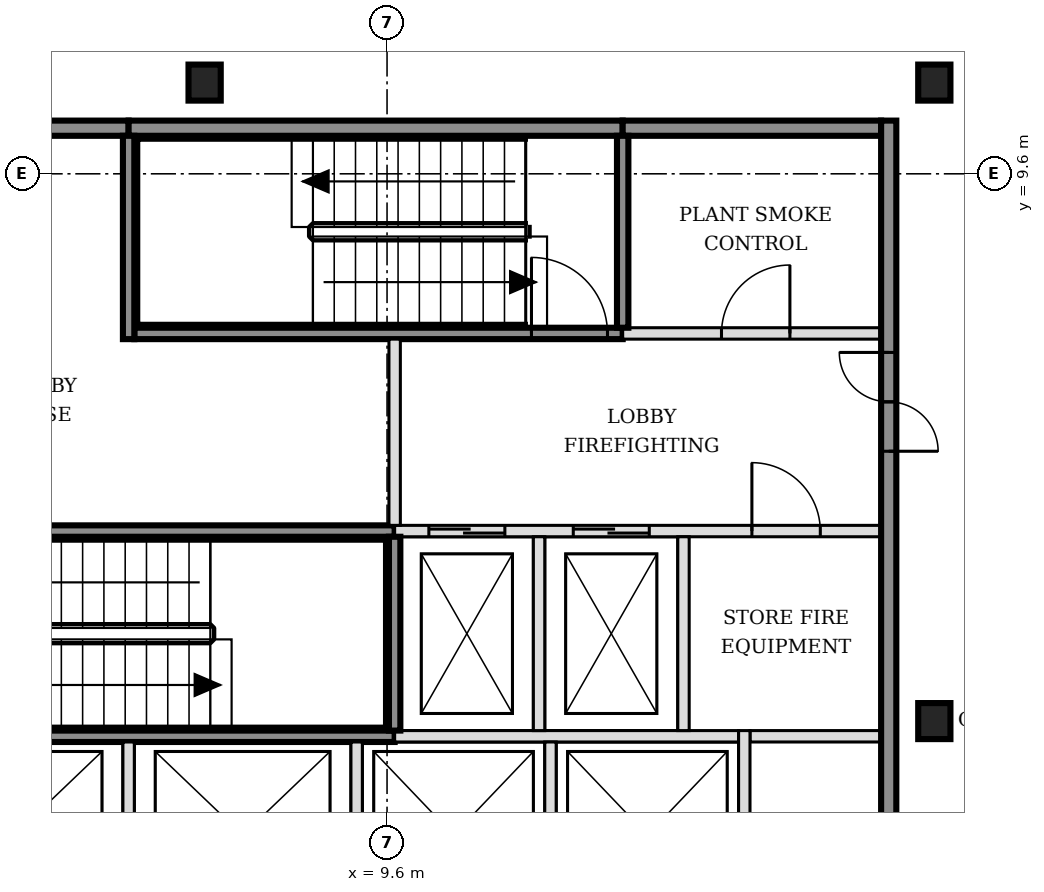
"""IFC4 building model, lengths in metres.
Left out: names, types, materials, properties, quantities, classifications, styles, units other than length and angle.
Written with IfcOpenShell. Run it as: python <this file> out.ifc"""

import sys

from ifc_helpers import new_model, si_unit, direction, frame, frame_2d, origin, origin_2d, place, context, subcontext, project, spatial, rectangle, i_section, extrude, element, fill, save


model = new_model("IFC4")
c1 = context("Model", 3, precision=1e-05, world=origin(), true_north=direction((0.0, 1.0)))
c2 = subcontext(c1, "Body", "Model", "MODEL_VIEW")
j1 = project(units=[si_unit("LENGTHUNIT", "METRE"), si_unit("PLANEANGLEUNIT", "RADIAN")], contexts=[c1])
p1 = place(None, origin())
s1 = spatial("IfcSite", under=j1, at=p1, CompositionType="ELEMENT")
p2 = place(p1, origin())
s2 = spatial("IfcBuilding", under=s1, at=p2, CompositionType="ELEMENT")
p3 = place(p2, frame((0.0, 0.0, 125.4)))
s3 = spatial("IfcBuildingStorey", under=s2, at=p3, CompositionType="ELEMENT", Elevation=125.4)
for number, where, z_axis, x_axis in (
    (1, (16.8, 2.4, -0.15), (0.0, 0.0, 1.0), (1.0, 0.0, 0.0)),
    (2, (7.2, 10.8, -0.15), (0.0, 0.0, 1.0), (1.0, 0.0, 0.0)),
    (3, (16.8, 10.8, -0.15), (0.0, 0.0, 1.0), (1.0, 0.0, 0.0)),
):
    element("IfcColumn", number, at=place(p3, frame(where, z_axis=z_axis, x_axis=x_axis)), inside=s3, PredefinedType="COLUMN", context=c2, shape_type="SweptSolid", body=[
        extrude(i_section(OverallWidth=0.424, OverallDepth=0.474, WebThickness=0.048, FlangeThickness=0.077, FilletRadius=0.015, at=origin_2d()), origin(), (0.0, 0.0, 1.0), 3.6),
    ])
p4 = place(p3, frame((3.2, 2.2, 0.0), z_axis=(0.0, 0.0, 1.0), x_axis=(1.0, 0.0, 0.0)))
e4 = element("IfcWall", 4, at=p4, inside=s3, PredefinedType="SOLIDWALL", context=c2, shape_type="SweptSolid", body=[
    extrude(rectangle(XDim=6.5, YDim=0.15, at=frame_2d((3.25, 0.0))), origin(), (0.0, 0.0, 1.0), 3.45),
])
p5 = place(p3, frame((9.7, 2.2, 0.0), z_axis=(0.0, 0.0, 1.0), x_axis=(1.0, 0.0, 0.0)))
e5 = element("IfcWall", 5, at=p5, inside=s3, PredefinedType="SOLIDWALL", context=c2, shape_type="SweptSolid", body=[
    extrude(rectangle(XDim=4.525, YDim=0.15, at=frame_2d((2.263, 0.0))), origin(), (0.0, 0.0, 1.0), 3.45),
])
p6 = place(p3, frame((14.375, 2.2, 0.0), z_axis=(0.0, 0.0, 1.0), x_axis=(1.0, 0.0, 0.0)))
e6 = element("IfcWall", 6, at=p6, inside=s3, PredefinedType="PARTITIONING", context=c2, shape_type="SweptSolid", body=[
    extrude(rectangle(XDim=1.725, YDim=0.15, at=frame_2d((0.863, 0.0))), origin(), (0.0, 0.0, 1.0), 3.45),
])
p7 = place(p3, frame((3.2, 4.9, 0.0), z_axis=(0.0, 0.0, 1.0), x_axis=(1.0, 0.0, 0.0)))
e7 = element("IfcWall", 7, at=p7, inside=s3, PredefinedType="SOLIDWALL", context=c2, shape_type="SweptSolid", body=[
    extrude(rectangle(XDim=6.5, YDim=0.15, at=frame_2d((3.25, 0.0))), origin(), (0.0, 0.0, 1.0), 3.45),
])
p8 = place(p7, frame((0.175, 0.0, 0.0)))
e8 = element("IfcOpeningElement", 8, at=p8, cuts=e7, PredefinedType="OPENING", context=c2, shape_type="SweptSolid", body=[
    extrude(rectangle(XDim=1.0, YDim=2.1, at=frame_2d((0.5, 1.05))), frame((0.0, 0.085, 0.0), z_axis=(0.0, -1.0, 0.0), x_axis=(1.0, 0.0, 0.0)), (0.0, 0.0, 1.0), 0.17),
])
p9 = place(p3, frame((9.7, 4.9, 0.0), z_axis=(0.0, 0.0, 1.0), x_axis=(1.0, 0.0, 0.0)))
e9 = element("IfcWall", 9, at=p9, inside=s3, PredefinedType="SOLIDWALL", context=c2, shape_type="SweptSolid", body=[
    extrude(rectangle(XDim=6.4, YDim=0.15, at=frame_2d((3.2, 0.0))), origin(), (0.0, 0.0, 1.0), 3.45),
])
p10 = place(p9, frame((0.45, 0.0, 0.0)))
e10 = element("IfcOpeningElement", 10, at=p10, cuts=e9, PredefinedType="OPENING", context=c2, shape_type="SweptSolid", body=[
    extrude(rectangle(XDim=1.0, YDim=2.1, at=frame_2d((0.5, 1.05))), frame((0.0, 0.085, 0.0), z_axis=(0.0, -1.0, 0.0), x_axis=(1.0, 0.0, 0.0)), (0.0, 0.0, 1.0), 0.17),
])
p11 = place(p9, frame((2.35, 0.0, 0.0)))
e11 = element("IfcOpeningElement", 11, at=p11, cuts=e9, PredefinedType="OPENING", context=c2, shape_type="SweptSolid", body=[
    extrude(rectangle(XDim=1.0, YDim=2.1, at=frame_2d((0.5, 1.05))), frame((0.0, 0.085, 0.0), z_axis=(0.0, -1.0, 0.0), x_axis=(1.0, 0.0, 0.0)), (0.0, 0.0, 1.0), 0.17),
])
p12 = place(p9, frame((4.7, 0.0, 0.0)))
e12 = element("IfcOpeningElement", 12, at=p12, cuts=e9, PredefinedType="OPENING", context=c2, shape_type="SweptSolid", body=[
    extrude(rectangle(XDim=0.9, YDim=2.1, at=frame_2d((0.45, 1.05))), frame((0.0, 0.085, 0.0), z_axis=(0.0, -1.0, 0.0), x_axis=(1.0, 0.0, 0.0)), (0.0, 0.0, 1.0), 0.17),
])
p13 = place(p3, frame((6.275, 7.5, 0.0), z_axis=(0.0, 0.0, 1.0), x_axis=(1.0, 0.0, 0.0)))
e13 = element("IfcWall", 13, at=p13, inside=s3, PredefinedType="SOLIDWALL", context=c2, shape_type="SweptSolid", body=[
    extrude(rectangle(XDim=6.425, YDim=0.15, at=frame_2d((3.212, 0.0))), origin(), (0.0, 0.0, 1.0), 3.45),
])
p14 = place(p13, frame((5.225, 0.0, 0.0)))
e14 = element("IfcOpeningElement", 14, at=p14, cuts=e13, PredefinedType="OPENING", context=c2, shape_type="SweptSolid", body=[
    extrude(rectangle(XDim=1.0, YDim=2.1, at=frame_2d((0.5, 1.05))), frame((0.0, 0.085, 0.0), z_axis=(0.0, -1.0, 0.0), x_axis=(1.0, 0.0, 0.0)), (0.0, 0.0, 1.0), 0.17),
])
p15 = place(p3, frame((12.7, 7.5, 0.0), z_axis=(0.0, 0.0, 1.0), x_axis=(1.0, 0.0, 0.0)))
e15 = element("IfcWall", 15, at=p15, inside=s3, PredefinedType="SOLIDWALL", context=c2, shape_type="SweptSolid", body=[
    extrude(rectangle(XDim=3.4, YDim=0.15, at=frame_2d((1.7, 0.0))), origin(), (0.0, 0.0, 1.0), 3.45),
])
p16 = place(p15, frame((1.3, 0.0, 0.0)))
e16 = element("IfcOpeningElement", 16, at=p16, cuts=e15, PredefinedType="OPENING", context=c2, shape_type="SweptSolid", body=[
    extrude(rectangle(XDim=0.9, YDim=2.1, at=frame_2d((0.45, 1.05))), frame((0.0, 0.085, 0.0), z_axis=(0.0, -1.0, 0.0), x_axis=(1.0, 0.0, 0.0)), (0.0, 0.0, 1.0), 0.17),
])
p17 = place(p3, frame((-1.7, 10.2, 0.0), z_axis=(0.0, 0.0, 1.0), x_axis=(1.0, 0.0, 0.0)))
e17 = element("IfcWall", 17, at=p17, inside=s3, PredefinedType="SOLIDWALL", context=c2, shape_type="SweptSolid", body=[
    extrude(rectangle(XDim=7.9, YDim=0.2, at=frame_2d((3.95, 0.0))), origin(), (0.0, 0.0, 1.0), 3.45),
])
p18 = place(p3, frame((6.2, 10.2, 0.0), z_axis=(0.0, 0.0, 1.0), x_axis=(1.0, 0.0, 0.0)))
e18 = element("IfcWall", 18, at=p18, inside=s3, PredefinedType="SOLIDWALL", context=c2, shape_type="SweptSolid", body=[
    extrude(rectangle(XDim=6.5, YDim=0.2, at=frame_2d((3.25, 0.0))), origin(), (0.0, 0.0, 1.0), 3.45),
])
p19 = place(p3, frame((12.7, 10.2, 0.0), z_axis=(0.0, 0.0, 1.0), x_axis=(1.0, 0.0, 0.0)))
e19 = element("IfcWall", 19, at=p19, inside=s3, PredefinedType="SOLIDWALL", context=c2, shape_type="SweptSolid", body=[
    extrude(rectangle(XDim=3.4, YDim=0.2, at=frame_2d((1.7, 0.0))), origin(), (0.0, 0.0, 1.0), 3.45),
])
p20 = place(p3, frame((6.2, -0.325, 0.0), z_axis=(0.0, 0.0, 1.0), x_axis=(0.0, 1.0, 0.0)))
e20 = element("IfcWall", 20, at=p20, inside=s3, PredefinedType="SOLIDWALL", context=c2, shape_type="SweptSolid", body=[
    extrude(rectangle(XDim=2.45, YDim=0.15, at=frame_2d((1.225, 0.0))), origin(), (0.0, 0.0, 1.0), 3.45),
])
p21 = place(p3, frame((6.2, 7.425, 0.0), z_axis=(0.0, 0.0, 1.0), x_axis=(0.0, 1.0, 0.0)))
e21 = element("IfcWall", 21, at=p21, inside=s3, PredefinedType="SOLIDWALL", context=c2, shape_type="SweptSolid", body=[
    extrude(rectangle(XDim=2.675, YDim=0.15, at=frame_2d((1.337, 0.0))), origin(), (0.0, 0.0, 1.0), 3.45),
])
p22 = place(p3, frame((9.2, -0.325, 0.0), z_axis=(0.0, 0.0, 1.0), x_axis=(0.0, 1.0, 0.0)))
e22 = element("IfcWall", 22, at=p22, inside=s3, PredefinedType="SOLIDWALL", context=c2, shape_type="SweptSolid", body=[
    extrude(rectangle(XDim=2.45, YDim=0.15, at=frame_2d((1.225, 0.0))), origin(), (0.0, 0.0, 1.0), 3.45),
])
p23 = place(p3, frame((9.7, 2.275, 0.0), z_axis=(0.0, 0.0, 1.0), x_axis=(0.0, 1.0, 0.0)))
e23 = element("IfcWall", 23, at=p23, inside=s3, PredefinedType="SOLIDWALL", context=c2, shape_type="SweptSolid", body=[
    extrude(rectangle(XDim=2.55, YDim=0.15, at=frame_2d((1.275, 0.0))), origin(), (0.0, 0.0, 1.0), 3.45),
])
p24 = place(p3, frame((9.7, 4.975, 0.0), z_axis=(0.0, 0.0, 1.0), x_axis=(0.0, 1.0, 0.0)))
e24 = element("IfcWall", 24, at=p24, inside=s3, PredefinedType="SOLIDWALL", context=c2, shape_type="SweptSolid", body=[
    extrude(rectangle(XDim=2.45, YDim=0.15, at=frame_2d((1.225, 0.0))), origin(), (0.0, 0.0, 1.0), 3.45),
])
p25 = place(p3, frame((11.6, 2.275, 0.0), z_axis=(0.0, 0.0, 1.0), x_axis=(0.0, 1.0, 0.0)))
e25 = element("IfcWall", 25, at=p25, inside=s3, PredefinedType="SOLIDWALL", context=c2, shape_type="SweptSolid", body=[
    extrude(rectangle(XDim=2.55, YDim=0.15, at=frame_2d((1.275, 0.0))), origin(), (0.0, 0.0, 1.0), 3.45),
])
p26 = place(p3, frame((11.75, -0.325, 0.0), z_axis=(0.0, 0.0, 1.0), x_axis=(0.0, 1.0, 0.0)))
e26 = element("IfcWall", 26, at=p26, inside=s3, PredefinedType="SOLIDWALL", context=c2, shape_type="SweptSolid", body=[
    extrude(rectangle(XDim=2.45, YDim=0.15, at=frame_2d((1.225, 0.0))), origin(), (0.0, 0.0, 1.0), 3.45),
])
p27 = place(p3, frame((12.7, 7.575, 0.0), z_axis=(0.0, 0.0, 1.0), x_axis=(0.0, 1.0, 0.0)))
e27 = element("IfcWall", 27, at=p27, inside=s3, PredefinedType="SOLIDWALL", context=c2, shape_type="SweptSolid", body=[
    extrude(rectangle(XDim=2.525, YDim=0.15, at=frame_2d((1.263, 0.0))), origin(), (0.0, 0.0, 1.0), 3.45),
])
p28 = place(p3, frame((13.5, 2.275, 0.0), z_axis=(0.0, 0.0, 1.0), x_axis=(0.0, 1.0, 0.0)))
e28 = element("IfcWall", 28, at=p28, inside=s3, PredefinedType="SOLIDWALL", context=c2, shape_type="SweptSolid", body=[
    extrude(rectangle(XDim=2.55, YDim=0.15, at=frame_2d((1.275, 0.0))), origin(), (0.0, 0.0, 1.0), 3.45),
])
p29 = place(p3, frame((14.3, -0.475, 0.0), z_axis=(0.0, 0.0, 1.0), x_axis=(0.0, 1.0, 0.0)))
e29 = element("IfcWall", 29, at=p29, inside=s3, PredefinedType="SOLIDWALL", context=c2, shape_type="SweptSolid", body=[
    extrude(rectangle(XDim=2.75, YDim=0.15, at=frame_2d((1.375, 0.0))), origin(), (0.0, 0.0, 1.0), 3.45),
])
p30 = place(p3, frame((16.2, -5.5, 0.0), z_axis=(0.0, 0.0, 1.0), x_axis=(0.0, 1.0, 0.0)))
e30 = element("IfcWall", 30, at=p30, inside=s3, PredefinedType="SOLIDWALL", context=c2, shape_type="SweptSolid", body=[
    extrude(rectangle(XDim=15.8, YDim=0.2, at=frame_2d((7.9, 0.0))), origin(), (0.0, 0.0, 1.0), 3.45),
])
p31 = place(p30, frame((3.05, 0.0, 0.0)))
e31 = element("IfcOpeningElement", 31, at=p31, cuts=e30, PredefinedType="OPENING", context=c2, shape_type="SweptSolid", body=[
    extrude(rectangle(XDim=1.3, YDim=2.1, at=frame_2d((0.65, 1.05))), frame((0.0, 0.11, 0.0), z_axis=(0.0, -1.0, 0.0), x_axis=(1.0, 0.0, 0.0)), (0.0, 0.0, 1.0), 0.22),
])
p32 = place(p30, frame((11.45, 0.0, 0.0)))
e32 = element("IfcOpeningElement", 32, at=p32, cuts=e30, PredefinedType="OPENING", context=c2, shape_type="SweptSolid", body=[
    extrude(rectangle(XDim=1.3, YDim=2.1, at=frame_2d((0.65, 1.05))), frame((0.0, 0.11, 0.0), z_axis=(0.0, -1.0, 0.0), x_axis=(1.0, 0.0, 0.0)), (0.0, 0.0, 1.0), 0.22),
])
p33 = place(p3, frame((27.472, 8.322, 0.0), z_axis=(0.0, 0.0, 1.0), x_axis=(-0.707106781187, 0.707106781187, 0.0)))
e33 = element("IfcWall", 33, at=p33, inside=s3, PredefinedType="PARTITIONING", context=c2, shape_type="SweptSolid", body=[
    extrude(rectangle(XDim=16.9, YDim=0.15, at=frame_2d((8.45, 0.0))), origin(), (0.0, 0.0, 1.0), 2.73),
])
p34 = place(p33, frame((3.044, 0.0, 0.0)))
e34 = element("IfcOpeningElement", 34, at=p34, cuts=e33, PredefinedType="OPENING", context=c2, shape_type="SweptSolid", body=[
    extrude(rectangle(XDim=0.9, YDim=2.1, at=frame_2d((0.45, 1.05))), frame((0.0, 0.085, 0.0), z_axis=(0.0, -1.0, 0.0), x_axis=(1.0, 0.0, 0.0)), (0.0, 0.0, 1.0), 0.17),
])
p35 = place(p33, frame((8.0, 0.0, 0.0)))
e35 = element("IfcOpeningElement", 35, at=p35, cuts=e33, PredefinedType="OPENING", context=c2, shape_type="SweptSolid", body=[
    extrude(rectangle(XDim=0.9, YDim=2.1, at=frame_2d((0.45, 1.05))), frame((0.0, 0.085, 0.0), z_axis=(0.0, -1.0, 0.0), x_axis=(1.0, 0.0, 0.0)), (0.0, 0.0, 1.0), 0.17),
])
p36 = place(p10, origin())
e36 = element("IfcDoor", 36, at=p36, inside=s3, OperationType="DOUBLE_DOOR_SLIDING", PredefinedType="DOOR", context=c2, shape_type="SweptSolid", body=[
    extrude(rectangle(XDim=1.0, YDim=2.1, at=frame_2d((0.5, 1.05))), frame((0.0, 0.025, 0.0), z_axis=(0.0, -1.0, 0.0), x_axis=(1.0, 0.0, 0.0)), (0.0, 0.0, 1.0), 0.05),
])
fill(e10, e36)
p37 = place(p11, origin())
e37 = element("IfcDoor", 37, at=p37, inside=s3, OperationType="DOUBLE_DOOR_SLIDING", PredefinedType="DOOR", context=c2, shape_type="SweptSolid", body=[
    extrude(rectangle(XDim=1.0, YDim=2.1, at=frame_2d((0.5, 1.05))), frame((0.0, 0.025, 0.0), z_axis=(0.0, -1.0, 0.0), x_axis=(1.0, 0.0, 0.0)), (0.0, 0.0, 1.0), 0.05),
])
fill(e11, e37)
p38 = place(p14, origin())
e38 = element("IfcDoor", 38, at=p38, inside=s3, OperationType="SINGLE_SWING_LEFT", PredefinedType="DOOR", context=c2, shape_type="SweptSolid", body=[
    extrude(rectangle(XDim=1.0, YDim=2.1, at=frame_2d((0.5, 1.05))), frame((0.0, 0.025, 0.0), z_axis=(0.0, -1.0, 0.0), x_axis=(1.0, 0.0, 0.0)), (0.0, 0.0, 1.0), 0.05),
])
fill(e14, e38)
p39 = place(p32, origin())
e39 = element("IfcDoor", 39, at=p39, inside=s3, OperationType="DOUBLE_DOOR_SINGLE_SWING", PredefinedType="DOOR", context=c2, shape_type="SweptSolid", body=[
    extrude(rectangle(XDim=1.3, YDim=2.1, at=frame_2d((0.65, 1.05))), frame((0.0, 0.025, 0.0), z_axis=(0.0, -1.0, 0.0), x_axis=(1.0, 0.0, 0.0)), (0.0, 0.0, 1.0), 0.05),
])
fill(e32, e39)
p40 = place(p12, origin())
e40 = element("IfcDoor", 40, at=p40, inside=s3, OperationType="SINGLE_SWING_LEFT", PredefinedType="DOOR", context=c2, shape_type="SweptSolid", body=[
    extrude(rectangle(XDim=0.9, YDim=2.1, at=frame_2d((0.45, 1.05))), frame((0.0, 0.025, 0.0), z_axis=(0.0, -1.0, 0.0), x_axis=(1.0, 0.0, 0.0)), (0.0, 0.0, 1.0), 0.05),
])
fill(e12, e40)
p41 = place(p16, origin())
e41 = element("IfcDoor", 41, at=p41, inside=s3, OperationType="SINGLE_SWING_RIGHT", PredefinedType="DOOR", context=c2, shape_type="SweptSolid", body=[
    extrude(rectangle(XDim=0.9, YDim=2.1, at=frame_2d((0.45, 1.05))), frame((0.0, 0.025, 0.0), z_axis=(0.0, -1.0, 0.0), x_axis=(1.0, 0.0, 0.0)), (0.0, 0.0, 1.0), 0.05),
])
fill(e16, e41)
save(model, sys.argv[1])
